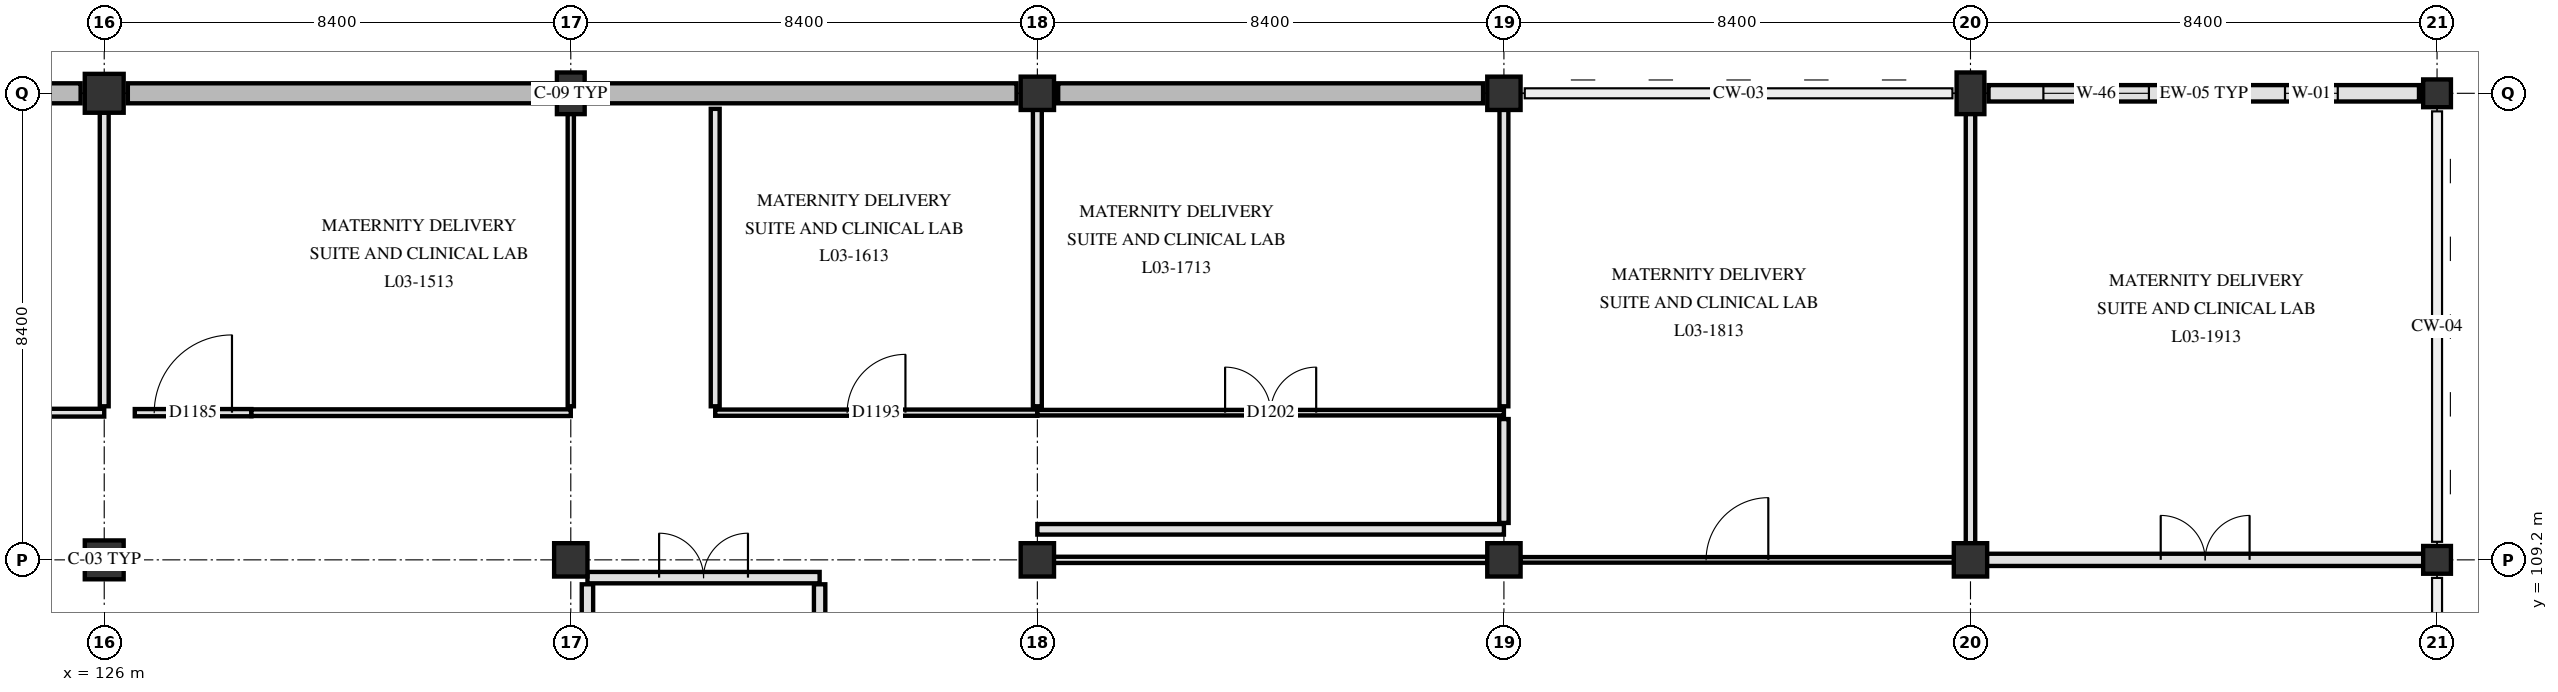
"""IFC4 building model, lengths in metres.
Left out: names, types, materials, properties, quantities, classifications, styles, units other than length and angle.
Written with IfcOpenShell. Run it as: python <this file> out.ifc"""

import sys

from ifc_helpers import new_model, si_unit, direction, frame, frame_2d, origin, origin_2d, place, context, subcontext, project, spatial, rectangle, extrude, element, fill, save


model = new_model("IFC4")
c1 = context("Model", 3, precision=1e-05, world=origin(), true_north=direction((0.0, 1.0)))
c2 = subcontext(c1, "Body", "Model", "MODEL_VIEW")
j1 = project(units=[si_unit("LENGTHUNIT", "METRE"), si_unit("PLANEANGLEUNIT", "RADIAN")], contexts=[c1])
p1 = place(None, origin())
s1 = spatial("IfcSite", under=j1, at=p1, CompositionType="ELEMENT")
p2 = place(p1, origin())
s2 = spatial("IfcBuilding", under=s1, at=p2, CompositionType="ELEMENT")
p3 = place(p2, frame((0.0, 0.0, 14.4)))
s3 = spatial("IfcBuildingStorey", under=s2, at=p3, CompositionType="ELEMENT", Elevation=14.4)
for number, where, z_axis, x_axis in (
    (1, (126.0, 109.2, 0.0), (0.0, 0.0, 1.0), (1.0, 0.0, 0.0)),
    (2, (126.0, 117.6, 0.0), (0.0, 0.0, 1.0), (1.0, 0.0, 0.0)),
):
    element("IfcColumn", number, at=place(p3, frame(where, z_axis=z_axis, x_axis=x_axis)), inside=s3, PredefinedType="COLUMN", context=c2, shape_type="SweptSolid", body=[
        extrude(rectangle(XDim=0.7, YDim=0.7, at=origin_2d()), origin(), (0.0, 0.0, 1.0), 4.2),
    ])
p4 = place(p3, frame((134.4, 109.2, 0.0), z_axis=(0.0, 0.0, 1.0), x_axis=(1.0, 0.0, 0.0)))
e3 = element("IfcColumn", 3, at=p4, inside=s3, PredefinedType="COLUMN", context=c2, shape_type="SweptSolid", body=[
    extrude(rectangle(XDim=0.6, YDim=0.6, at=origin_2d()), origin(), (0.0, 0.0, 1.0), 4.2),
])
p5 = place(p3, frame((134.4, 117.6, 0.0), z_axis=(0.0, 0.0, 1.0), x_axis=(1.0, 0.0, 0.0)))
e4 = element("IfcColumn", 4, at=p5, inside=s3, PredefinedType="PILASTER", context=c2, shape_type="SweptSolid", body=[
    extrude(rectangle(XDim=0.5, YDim=0.75, at=origin_2d()), origin(), (0.0, 0.0, 1.0), 4.2),
])
for number, where, z_axis, x_axis in (
    (5, (142.8, 109.2, 0.0), (0.0, 0.0, 1.0), (1.0, 0.0, 0.0)),
    (6, (142.8, 117.6, 0.0), (0.0, 0.0, 1.0), (1.0, 0.0, 0.0)),
    (7, (151.2, 109.2, 0.0), (0.0, 0.0, 1.0), (1.0, 0.0, 0.0)),
    (8, (151.2, 117.6, 0.0), (0.0, 0.0, 1.0), (1.0, 0.0, 0.0)),
    (9, (159.6, 109.2, 0.0), (0.0, 0.0, 1.0), (1.0, 0.0, 0.0)),
):
    element("IfcColumn", number, at=place(p3, frame(where, z_axis=z_axis, x_axis=x_axis)), inside=s3, PredefinedType="COLUMN", context=c2, shape_type="SweptSolid", body=[
        extrude(rectangle(XDim=0.6, YDim=0.6, at=origin_2d()), origin(), (0.0, 0.0, 1.0), 4.2),
    ])
p6 = place(p3, frame((159.6, 117.6, 0.0), z_axis=(0.0, 0.0, 1.0), x_axis=(1.0, 0.0, 0.0)))
e10 = element("IfcColumn", 10, at=p6, inside=s3, PredefinedType="PILASTER", context=c2, shape_type="SweptSolid", body=[
    extrude(rectangle(XDim=0.5, YDim=0.75, at=origin_2d()), origin(), (0.0, 0.0, 1.0), 4.2),
])
for number, where, z_axis, x_axis in (
    (11, (168.0, 109.2, 0.0), (0.0, 0.0, 1.0), (1.0, 0.0, 0.0)),
    (12, (168.0, 117.6, 0.0), (0.0, 0.0, 1.0), (1.0, 0.0, 0.0)),
):
    element("IfcColumn", number, at=place(p3, frame(where, z_axis=z_axis, x_axis=x_axis)), inside=s3, PredefinedType="COLUMN", context=c2, shape_type="SweptSolid", body=[
        extrude(rectangle(XDim=0.5, YDim=0.5, at=origin_2d()), origin(), (0.0, 0.0, 1.0), 4.2),
    ])
p7 = place(p3, frame((118.025, 117.6, 0.0), z_axis=(0.0, 0.0, 1.0), x_axis=(1.0, 0.0, 0.0)))
e13 = element("IfcWall", 13, at=p7, inside=s3, PredefinedType="SOLIDWALL", context=c2, shape_type="SweptSolid", body=[
    extrude(rectangle(XDim=7.55, YDim=0.36, at=frame_2d((3.775, 0.0))), origin(), (0.0, 0.0, 1.0), 3.9),
])
p8 = place(p3, frame((126.425, 117.6, 0.0), z_axis=(0.0, 0.0, 1.0), x_axis=(1.0, 0.0, 0.0)))
e14 = element("IfcWall", 14, at=p8, inside=s3, PredefinedType="SOLIDWALL", context=c2, shape_type="SweptSolid", body=[
    extrude(rectangle(XDim=7.65, YDim=0.36, at=frame_2d((3.825, 0.0))), origin(), (0.0, 0.0, 1.0), 3.9),
])
p9 = place(p3, frame((134.725, 117.6, 0.0), z_axis=(0.0, 0.0, 1.0), x_axis=(1.0, 0.0, 0.0)))
e15 = element("IfcWall", 15, at=p9, inside=s3, PredefinedType="SOLIDWALL", context=c2, shape_type="SweptSolid", body=[
    extrude(rectangle(XDim=7.7, YDim=0.36, at=frame_2d((3.85, 0.0))), origin(), (0.0, 0.0, 1.0), 3.9),
])
p10 = place(p3, frame((143.175, 117.6, 0.0), z_axis=(0.0, 0.0, 1.0), x_axis=(1.0, 0.0, 0.0)))
e16 = element("IfcWall", 16, at=p10, inside=s3, PredefinedType="SOLIDWALL", context=c2, shape_type="SweptSolid", body=[
    extrude(rectangle(XDim=7.65, YDim=0.36, at=frame_2d((3.825, 0.0))), origin(), (0.0, 0.0, 1.0), 3.9),
])
p11 = place(p3, frame((159.925, 117.6, 0.0), z_axis=(0.0, 0.0, 1.0), x_axis=(1.0, 0.0, 0.0)))
e17 = element("IfcWall", 17, at=p11, inside=s3, PredefinedType="SOLIDWALL", context=c2, shape_type="SweptSolid", body=[
    extrude(rectangle(XDim=7.75, YDim=0.295, at=frame_2d((3.875, 0.0))), origin(), (0.0, 0.0, 1.0), 2.89),
])
p12 = place(p11, frame((0.988, 0.0, 0.85)))
e18 = element("IfcOpeningElement", 18, at=p12, cuts=e17, PredefinedType="OPENING", context=c2, shape_type="SweptSolid", body=[
    extrude(rectangle(XDim=1.9, YDim=1.78, at=frame_2d((0.95, 0.89))), frame((0.0, 0.157, 0.0), z_axis=(0.0, -1.0, 0.0), x_axis=(1.0, 0.0, 0.0)), (0.0, 0.0, 1.0), 0.315),
])
p13 = place(p11, frame((5.337, 0.0, 0.85)))
e19 = element("IfcOpeningElement", 19, at=p13, cuts=e17, PredefinedType="OPENING", context=c2, shape_type="SweptSolid", body=[
    extrude(rectangle(XDim=0.95, YDim=1.3, at=frame_2d((0.475, 0.65))), frame((0.0, 0.157, 0.0), z_axis=(0.0, -1.0, 0.0), x_axis=(1.0, 0.0, 0.0)), (0.0, 0.0, 1.0), 0.315),
])
p14 = place(p3, frame((138.88, 104.64, 0.0), z_axis=(0.0, 0.0, 1.0), x_axis=(0.0, 1.0, 0.0)))
e20 = element("IfcWall", 20, at=p14, inside=s3, PredefinedType="PARTITIONING", context=c2, shape_type="SweptSolid", body=[
    extrude(rectangle(XDim=4.12, YDim=0.205, at=frame_2d((2.06, 0.0))), origin(), (0.0, 0.0, 1.0), 3.89),
])
p15 = place(p3, frame((134.7, 104.64, 0.0), z_axis=(0.0, 0.0, 1.0), x_axis=(0.0, 1.0, 0.0)))
e21 = element("IfcWall", 21, at=p15, inside=s3, PredefinedType="PARTITIONING", context=c2, shape_type="SweptSolid", body=[
    extrude(rectangle(XDim=4.12, YDim=0.205, at=frame_2d((2.06, 0.0))), origin(), (0.0, 0.0, 1.0), 3.34),
])
p16 = place(p3, frame((134.7, 108.88, 0.0), z_axis=(0.0, 0.0, 1.0), x_axis=(1.0, 0.0, 0.0)))
e22 = element("IfcWall", 22, at=p16, inside=s3, PredefinedType="PARTITIONING", context=c2, shape_type="SweptSolid", body=[
    extrude(rectangle(XDim=4.18, YDim=0.205, at=frame_2d((2.09, 0.0))), origin(), (0.0, 0.0, 1.0), 3.29),
])
p17 = place(p16, frame((1.29, 0.0, 0.0)))
e23 = element("IfcOpeningElement", 23, at=p17, cuts=e22, PredefinedType="OPENING", context=c2, shape_type="SweptSolid", body=[
    extrude(rectangle(XDim=1.6, YDim=2.25, at=frame_2d((0.8, 1.125))), frame((0.0, 0.113, 0.0), z_axis=(0.0, -1.0, 0.0), x_axis=(1.0, 0.0, 0.0)), (0.0, 0.0, 1.0), 0.225),
])
p18 = place(p3, frame((143.095, 109.2, 0.0), z_axis=(0.0, 0.0, 1.0), x_axis=(1.0, 0.0, 0.0)))
e24 = element("IfcWall", 24, at=p18, inside=s3, PredefinedType="PARTITIONING", context=c2, shape_type="SweptSolid", body=[
    extrude(rectangle(XDim=7.81, YDim=0.112, at=frame_2d((3.905, 0.0))), origin(), (0.0, 0.0, 1.0), 3.29),
])
p19 = place(p3, frame((151.495, 109.2, 0.0), z_axis=(0.0, 0.0, 1.0), x_axis=(1.0, 0.0, 0.0)))
e25 = element("IfcWall", 25, at=p19, inside=s3, PredefinedType="PARTITIONING", context=c2, shape_type="SweptSolid", body=[
    extrude(rectangle(XDim=7.81, YDim=0.1, at=frame_2d((3.905, 0.0))), origin(), (0.0, 0.0, 1.0), 3.29),
])
p20 = place(p19, frame((3.345, 0.0, 0.0)))
e26 = element("IfcOpeningElement", 26, at=p20, cuts=e25, PredefinedType="OPENING", context=c2, shape_type="SweptSolid", body=[
    extrude(rectangle(XDim=1.12, YDim=2.18, at=frame_2d((0.56, 1.09))), frame((0.0, 0.06, 0.0), z_axis=(0.0, -1.0, 0.0), x_axis=(1.0, 0.0, 0.0)), (0.0, 0.0, 1.0), 0.12),
])
p21 = place(p3, frame((159.895, 109.2, 0.0), z_axis=(0.0, 0.0, 1.0), x_axis=(1.0, 0.0, 0.0)))
e27 = element("IfcWall", 27, at=p21, inside=s3, PredefinedType="PARTITIONING", context=c2, shape_type="SweptSolid", body=[
    extrude(rectangle(XDim=7.86, YDim=0.22, at=frame_2d((3.93, 0.0))), origin(), (0.0, 0.0, 1.0), 3.29),
])
p22 = place(p21, frame((3.13, 0.0, 0.0)))
e28 = element("IfcOpeningElement", 28, at=p22, cuts=e27, PredefinedType="OPENING", context=c2, shape_type="SweptSolid", body=[
    extrude(rectangle(XDim=1.6, YDim=2.25, at=frame_2d((0.8, 1.125))), frame((0.0, 0.12, 0.0), z_axis=(0.0, -1.0, 0.0), x_axis=(1.0, 0.0, 0.0)), (0.0, 0.0, 1.0), 0.24),
])
p23 = place(p3, frame((142.8, 109.75, 0.0), z_axis=(0.0, 0.0, 1.0), x_axis=(1.0, 0.0, 0.0)))
e29 = element("IfcWall", 29, at=p23, inside=s3, PredefinedType="PARTITIONING", context=c2, shape_type="SweptSolid", body=[
    extrude(rectangle(XDim=8.4, YDim=0.19, at=frame_2d((4.2, 0.0))), origin(), (0.0, 0.0, 1.0), 3.34),
])
p24 = place(p3, frame((117.6, 111.85, 0.0), z_axis=(0.0, 0.0, 1.0), x_axis=(1.0, 0.0, 0.0)))
e30 = element("IfcWall", 30, at=p24, inside=s3, PredefinedType="PARTITIONING", context=c2, shape_type="SweptSolid", body=[
    extrude(rectangle(XDim=8.4, YDim=0.14, at=frame_2d((4.2, 0.0))), origin(), (0.0, 0.0, 1.0), 2.69),
])
p25 = place(p24, frame((3.69, 0.0, 0.0)))
e31 = element("IfcOpeningElement", 31, at=p25, cuts=e30, PredefinedType="OPENING", context=c2, shape_type="SweptSolid", body=[
    extrude(rectangle(XDim=1.02, YDim=2.12, at=frame_2d((0.51, 1.06))), frame((0.0, 0.08, 0.0), z_axis=(0.0, -1.0, 0.0), x_axis=(1.0, 0.0, 0.0)), (0.0, 0.0, 1.0), 0.16),
])
p26 = place(p3, frame((126.55, 111.85, 0.0), z_axis=(0.0, 0.0, 1.0), x_axis=(1.0, 0.0, 0.0)))
e32 = element("IfcWall", 32, at=p26, inside=s3, PredefinedType="PARTITIONING", context=c2, shape_type="SweptSolid", body=[
    extrude(rectangle(XDim=2.1, YDim=0.13, at=frame_2d((1.05, 0.0))), origin(), (0.0, 0.0, 1.0), 3.89),
])
p27 = place(p26, frame((0.35, 0.0, 0.0)))
e33 = element("IfcOpeningElement", 33, at=p27, cuts=e32, PredefinedType="OPENING", context=c2, shape_type="SweptSolid", body=[
    extrude(rectangle(XDim=1.4, YDim=2.2, at=frame_2d((0.7, 1.1))), frame((0.0, 0.075, 0.0), z_axis=(0.0, -1.0, 0.0), x_axis=(1.0, 0.0, 0.0)), (0.0, 0.0, 1.0), 0.15),
])
p28 = place(p3, frame((128.65, 111.85, 0.0), z_axis=(0.0, 0.0, 1.0), x_axis=(1.0, 0.0, 0.0)))
e34 = element("IfcWall", 34, at=p28, inside=s3, PredefinedType="PARTITIONING", context=c2, shape_type="SweptSolid", body=[
    extrude(rectangle(XDim=5.75, YDim=0.12, at=frame_2d((2.875, 0.0))), origin(), (0.0, 0.0, 1.0), 3.34),
])
p29 = place(p3, frame((137.0, 111.85, 0.0), z_axis=(0.0, 0.0, 1.0), x_axis=(1.0, 0.0, 0.0)))
e35 = element("IfcWall", 35, at=p29, inside=s3, PredefinedType="PARTITIONING", context=c2, shape_type="SweptSolid", body=[
    extrude(rectangle(XDim=5.8, YDim=0.112, at=frame_2d((2.9, 0.0))), origin(), (0.0, 0.0, 1.0), 3.34),
])
p30 = place(p29, frame((2.375, 0.0, 0.0)))
e36 = element("IfcOpeningElement", 36, at=p30, cuts=e35, PredefinedType="OPENING", context=c2, shape_type="SweptSolid", body=[
    extrude(rectangle(XDim=1.05, YDim=2.15, at=frame_2d((0.525, 1.075))), frame((0.0, 0.066, 0.0), z_axis=(0.0, -1.0, 0.0), x_axis=(1.0, 0.0, 0.0)), (0.0, 0.0, 1.0), 0.132),
])
p31 = place(p3, frame((142.8, 111.85, 0.0), z_axis=(0.0, 0.0, 1.0), x_axis=(1.0, 0.0, 0.0)))
e37 = element("IfcWall", 37, at=p31, inside=s3, PredefinedType="PARTITIONING", context=c2, shape_type="SweptSolid", body=[
    extrude(rectangle(XDim=8.4, YDim=0.1, at=frame_2d((4.2, 0.0))), origin(), (0.0, 0.0, 1.0), 3.34),
])
p32 = place(p31, frame((3.38, 0.0, 0.0)))
e38 = element("IfcOpeningElement", 38, at=p32, cuts=e37, PredefinedType="OPENING", context=c2, shape_type="SweptSolid", body=[
    extrude(rectangle(XDim=1.64, YDim=2.28, at=frame_2d((0.82, 1.14))), frame((0.0, 0.06, 0.0), z_axis=(0.0, -1.0, 0.0), x_axis=(1.0, 0.0, 0.0)), (0.0, 0.0, 1.0), 0.12),
])
p33 = place(p3, frame((126.0, 111.965, 0.0), z_axis=(0.0, 0.0, 1.0), x_axis=(0.0, 1.0, 0.0)))
e39 = element("IfcWall", 39, at=p33, inside=s3, PredefinedType="PARTITIONING", context=c2, shape_type="SweptSolid", body=[
    extrude(rectangle(XDim=5.29, YDim=0.16, at=frame_2d((2.645, 0.0))), origin(), (0.0, 0.0, 1.0), 2.69),
])
p34 = place(p3, frame((134.4, 111.965, 0.0), z_axis=(0.0, 0.0, 1.0), x_axis=(0.0, 1.0, 0.0)))
e40 = element("IfcWall", 40, at=p34, inside=s3, PredefinedType="PARTITIONING", context=c2, shape_type="SweptSolid", body=[
    extrude(rectangle(XDim=5.265, YDim=0.112, at=frame_2d((2.632, 0.0))), origin(), (0.0, 0.0, 1.0), 3.34),
])
p35 = place(p3, frame((137.0, 111.965, 0.0), z_axis=(0.0, 0.0, 1.0), x_axis=(0.0, 1.0, 0.0)))
e41 = element("IfcWall", 41, at=p35, inside=s3, PredefinedType="PARTITIONING", context=c2, shape_type="SweptSolid", body=[
    extrude(rectangle(XDim=5.355, YDim=0.16, at=frame_2d((2.677, 0.0))), origin(), (0.0, 0.0, 1.0), 2.89),
])
p36 = place(p3, frame((142.8, 111.965, 0.0), z_axis=(0.0, 0.0, 1.0), x_axis=(0.0, 1.0, 0.0)))
e42 = element("IfcWall", 42, at=p36, inside=s3, PredefinedType="PARTITIONING", context=c2, shape_type="SweptSolid", body=[
    extrude(rectangle(XDim=5.34, YDim=0.16, at=frame_2d((2.67, 0.0))), origin(), (0.0, 0.0, 1.0), 3.34),
])
p37 = place(p3, frame((151.2, 109.865, 0.0), z_axis=(0.0, 0.0, 1.0), x_axis=(0.0, 1.0, 0.0)))
e43 = element("IfcWall", 43, at=p37, inside=s3, PredefinedType="PARTITIONING", context=c2, shape_type="SweptSolid", body=[
    extrude(rectangle(XDim=1.87, YDim=0.17, at=frame_2d((0.935, 0.0))), origin(), (0.0, 0.0, 1.0), 3.34),
])
p38 = place(p3, frame((151.2, 111.965, 0.0), z_axis=(0.0, 0.0, 1.0), x_axis=(0.0, 1.0, 0.0)))
e44 = element("IfcWall", 44, at=p38, inside=s3, PredefinedType="PARTITIONING", context=c2, shape_type="SweptSolid", body=[
    extrude(rectangle(XDim=5.34, YDim=0.16, at=frame_2d((2.67, 0.0))), origin(), (0.0, 0.0, 1.0), 3.34),
])
p39 = place(p3, frame((159.6, 109.495, 0.0), z_axis=(0.0, 0.0, 1.0), x_axis=(0.0, 1.0, 0.0)))
e45 = element("IfcWall", 45, at=p39, inside=s3, PredefinedType="PARTITIONING", context=c2, shape_type="SweptSolid", body=[
    extrude(rectangle(XDim=7.735, YDim=0.17, at=frame_2d((3.867, 0.0))), origin(), (0.0, 0.0, 1.0), 3.34),
])
p40 = place(p12, origin())
e46 = element("IfcWindow", 46, at=p40, inside=s3, PartitioningType="SINGLE_PANEL", PredefinedType="WINDOW", context=c2, shape_type="SweptSolid", body=[
    extrude(rectangle(XDim=1.9, YDim=1.78, at=frame_2d((0.95, 0.89))), frame((0.0, 0.03, 0.0), z_axis=(0.0, -1.0, 0.0), x_axis=(1.0, 0.0, 0.0)), (0.0, 0.0, 1.0), 0.06),
])
fill(e18, e46)
p41 = place(p13, origin())
e47 = element("IfcWindow", 47, at=p41, inside=s3, PartitioningType="SINGLE_PANEL", PredefinedType="WINDOW", context=c2, shape_type="SweptSolid", body=[
    extrude(rectangle(XDim=0.95, YDim=1.3, at=frame_2d((0.475, 0.65))), frame((0.0, 0.03, 0.0), z_axis=(0.0, -1.0, 0.0), x_axis=(1.0, 0.0, 0.0)), (0.0, 0.0, 1.0), 0.06),
])
fill(e19, e47)
p42 = place(p17, origin())
e48 = element("IfcDoor", 48, at=p42, inside=s3, OperationType="DOUBLE_SWING_LEFT", PredefinedType="DOOR", context=c2, shape_type="SweptSolid", body=[
    extrude(rectangle(XDim=1.6, YDim=2.25, at=frame_2d((0.8, 1.125))), frame((0.0, 0.025, 0.0), z_axis=(0.0, -1.0, 0.0), x_axis=(1.0, 0.0, 0.0)), (0.0, 0.0, 1.0), 0.05),
])
fill(e23, e48)
p43 = place(p27, origin())
e49 = element("IfcDoor", 49, at=p43, inside=s3, OperationType="SINGLE_SWING_RIGHT", PredefinedType="DOOR", context=c2, shape_type="SweptSolid", body=[
    extrude(rectangle(XDim=1.4, YDim=2.2, at=frame_2d((0.7, 1.1))), frame((0.0, 0.025, 0.0), z_axis=(0.0, -1.0, 0.0), x_axis=(1.0, 0.0, 0.0)), (0.0, 0.0, 1.0), 0.05),
])
fill(e33, e49)
p44 = place(p30, origin())
e50 = element("IfcDoor", 50, at=p44, inside=s3, OperationType="SINGLE_SWING_RIGHT", PredefinedType="DOOR", context=c2, shape_type="SweptSolid", body=[
    extrude(rectangle(XDim=1.05, YDim=2.15, at=frame_2d((0.525, 1.075))), frame((0.0, 0.025, 0.0), z_axis=(0.0, -1.0, 0.0), x_axis=(1.0, 0.0, 0.0)), (0.0, 0.0, 1.0), 0.05),
])
fill(e36, e50)
p45 = place(p32, origin())
e51 = element("IfcDoor", 51, at=p45, inside=s3, OperationType="DOUBLE_SWING_LEFT", PredefinedType="DOOR", context=c2, shape_type="SweptSolid", body=[
    extrude(rectangle(XDim=1.64, YDim=2.28, at=frame_2d((0.82, 1.14))), frame((0.0, 0.025, 0.0), z_axis=(0.0, -1.0, 0.0), x_axis=(1.0, 0.0, 0.0)), (0.0, 0.0, 1.0), 0.05),
])
fill(e38, e51)
p46 = place(p20, origin())
e52 = element("IfcDoor", 52, at=p46, inside=s3, OperationType="SINGLE_SWING_RIGHT", PredefinedType="DOOR", context=c2, shape_type="SweptSolid", body=[
    extrude(rectangle(XDim=1.12, YDim=2.18, at=frame_2d((0.56, 1.09))), frame((0.0, 0.025, 0.0), z_axis=(0.0, -1.0, 0.0), x_axis=(1.0, 0.0, 0.0)), (0.0, 0.0, 1.0), 0.05),
])
fill(e26, e52)
p47 = place(p22, origin())
e53 = element("IfcDoor", 53, at=p47, inside=s3, OperationType="DOUBLE_SWING_LEFT", PredefinedType="DOOR", context=c2, shape_type="SweptSolid", body=[
    extrude(rectangle(XDim=1.6, YDim=2.25, at=frame_2d((0.8, 1.125))), frame((0.0, 0.025, 0.0), z_axis=(0.0, -1.0, 0.0), x_axis=(1.0, 0.0, 0.0)), (0.0, 0.0, 1.0), 0.05),
])
fill(e28, e53)
save(model, sys.argv[1])
